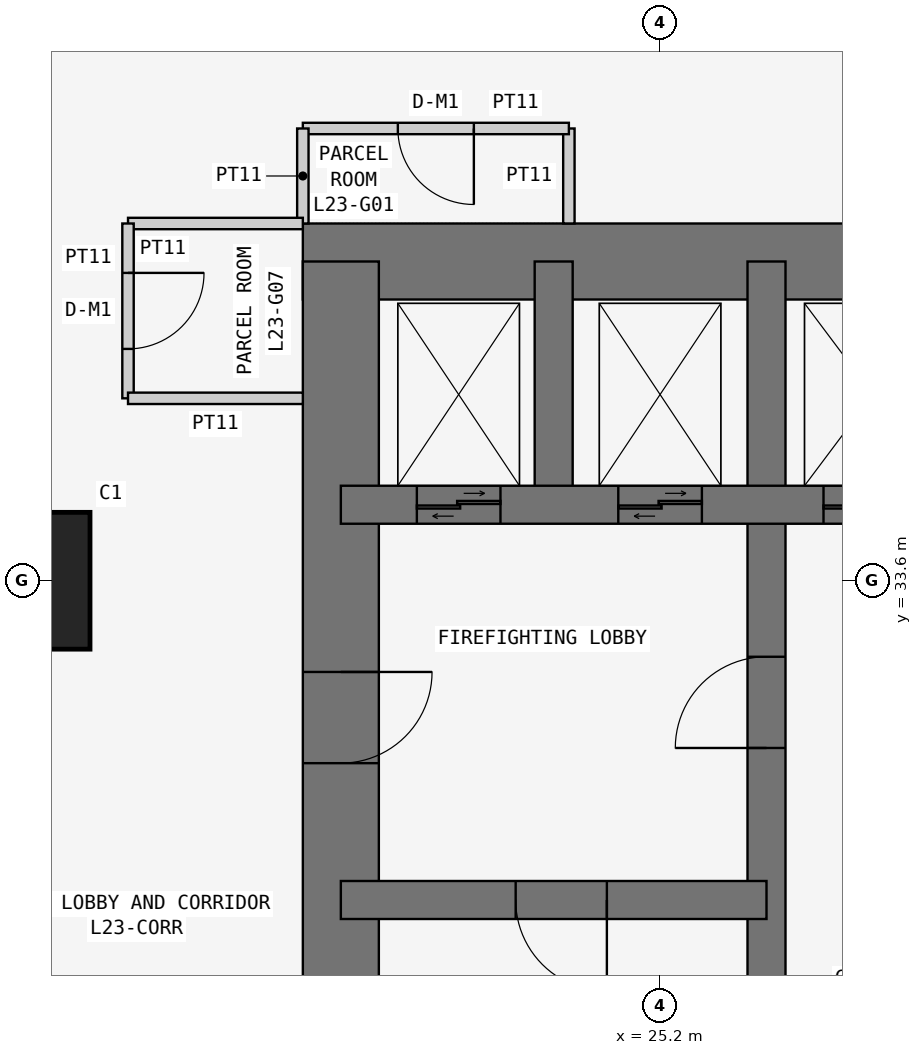
"""IFC4 building model, lengths in metres.
Left out: names, types, materials, properties, quantities, classifications, styles, units other than length and angle.
Written with IfcOpenShell. Run it as: python <this file> out.ifc"""

import sys

from ifc_helpers import new_model, si_unit, direction, frame, frame_2d, origin, origin_2d, place, context, subcontext, project, spatial, rectangle, extrude, element, fill, save


model = new_model("IFC4")
c1 = context("Model", 3, precision=1e-05, world=origin(), true_north=direction((0.0, 1.0)))
c2 = subcontext(c1, "Body", "Model", "MODEL_VIEW")
j1 = project(units=[si_unit("LENGTHUNIT", "METRE"), si_unit("PLANEANGLEUNIT", "RADIAN")], contexts=[c1])
p1 = place(None, origin())
s1 = spatial("IfcSite", under=j1, at=p1, CompositionType="ELEMENT")
p2 = place(p1, origin())
s2 = spatial("IfcBuilding", under=s1, at=p2, CompositionType="ELEMENT")
p3 = place(p2, frame((0.0, 0.0, 92.1)))
s3 = spatial("IfcBuildingStorey", under=s2, at=p3, CompositionType="ELEMENT", Elevation=92.1)
p4 = place(p3, frame((16.8, 33.6, 0.0), z_axis=(0.0, 0.0, 1.0), x_axis=(1.0, 0.0, 0.0)))
e1 = element("IfcColumn", 1, at=p4, inside=s3, PredefinedType="COLUMN", context=c2, shape_type="SweptSolid", body=[
    extrude(rectangle(XDim=1.8, YDim=1.8, at=origin_2d()), origin(), (0.0, 0.0, 1.0), 3.6),
])
p5 = place(p3, frame((37.8, 37.8, 0.0), z_axis=(0.0, 0.0, 1.0), x_axis=(-1.0, 0.0, 0.0)))
e2 = element("IfcWall", 2, at=p5, inside=s3, PredefinedType="SHEAR", context=c2, shape_type="SweptSolid", body=[
    extrude(rectangle(XDim=17.3, YDim=1.0, at=frame_2d((8.65, 0.0))), origin(), (0.0, 0.0, 1.0), 3.6),
])
p6 = place(p3, frame((21.0, 37.8, 0.0), z_axis=(0.0, 0.0, 1.0), x_axis=(0.0, -1.0, 0.0)))
e3 = element("IfcWall", 3, at=p6, inside=s3, PredefinedType="SHEAR", context=c2, shape_type="SweptSolid", body=[
    extrude(rectangle(XDim=17.3, YDim=1.0, at=frame_2d((8.65, 0.0))), origin(), (0.0, 0.0, 1.0), 3.6),
])
p7 = place(p6, frame((5.4, 0.0, 0.0)))
e4 = element("IfcOpeningElement", 4, at=p7, cuts=e3, PredefinedType="OPENING", context=c2, shape_type="SweptSolid", body=[
    extrude(rectangle(XDim=1.2, YDim=2.1, at=frame_2d((0.6, 1.05))), frame((0.0, 0.51, 0.0), z_axis=(0.0, -1.0, 0.0), x_axis=(1.0, 0.0, 0.0)), (0.0, 0.0, 1.0), 1.02),
])
p8 = place(p3, frame((26.6, 21.0, 0.0), z_axis=(0.0, 0.0, 1.0), x_axis=(0.0, 1.0, 0.0)))
e5 = element("IfcWall", 5, at=p8, inside=s3, PredefinedType="SHEAR", context=c2, shape_type="SweptSolid", body=[
    extrude(rectangle(XDim=16.8, YDim=0.5, at=frame_2d((8.4, 0.0))), origin(), (0.0, 0.0, 1.0), 3.6),
])
p9 = place(p8, frame((10.4, 0.0, 0.0)))
e6 = element("IfcOpeningElement", 6, at=p9, cuts=e5, PredefinedType="OPENING", context=c2, shape_type="SweptSolid", body=[
    extrude(rectangle(XDim=1.2, YDim=2.1, at=frame_2d((0.6, 1.05))), frame((0.0, 0.26, 0.0), z_axis=(0.0, -1.0, 0.0), x_axis=(1.0, 0.0, 0.0)), (0.0, 0.0, 1.0), 0.52),
])
p10 = place(p3, frame((21.0, 29.4, 0.0), z_axis=(0.0, 0.0, 1.0), x_axis=(1.0, 0.0, 0.0)))
e7 = element("IfcWall", 7, at=p10, inside=s3, PredefinedType="SHEAR", context=c2, shape_type="SweptSolid", body=[
    extrude(rectangle(XDim=5.6, YDim=0.5, at=frame_2d((2.8, 0.0))), origin(), (0.0, 0.0, 1.0), 3.6),
])
p11 = place(p10, frame((2.3, 0.0, 0.0)))
e8 = element("IfcOpeningElement", 8, at=p11, cuts=e7, PredefinedType="OPENING", context=c2, shape_type="SweptSolid", body=[
    extrude(rectangle(XDim=1.2, YDim=2.1, at=frame_2d((0.6, 1.05))), frame((0.0, 0.26, 0.0), z_axis=(0.0, -1.0, 0.0), x_axis=(1.0, 0.0, 0.0)), (0.0, 0.0, 1.0), 0.52),
])
p12 = place(p3, frame((21.0, 34.6, 0.0), z_axis=(0.0, 0.0, 1.0), x_axis=(1.0, 0.0, 0.0)))
e9 = element("IfcWall", 9, at=p12, inside=s3, PredefinedType="SHEAR", context=c2, shape_type="SweptSolid", body=[
    extrude(rectangle(XDim=11.2, YDim=0.5, at=frame_2d((5.6, 0.0))), origin(), (0.0, 0.0, 1.0), 3.6),
])
p13 = place(p12, frame((9.35, 0.0, 0.0)))
e10 = element("IfcOpeningElement", 10, at=p13, cuts=e9, PredefinedType="OPENING", context=c2, shape_type="SweptSolid", body=[
    extrude(rectangle(XDim=0.9, YDim=2.1, at=frame_2d((0.45, 1.05))), frame((0.0, 0.26, 0.0), z_axis=(0.0, -1.0, 0.0), x_axis=(1.0, 0.0, 0.0)), (0.0, 0.0, 1.0), 0.52),
])
p14 = place(p12, frame((1.0, 0.0, 0.0)))
e11 = element("IfcOpeningElement", 11, at=p14, cuts=e9, PredefinedType="OPENING", context=c2, shape_type="SweptSolid", body=[
    extrude(rectangle(XDim=1.1, YDim=2.1, at=frame_2d((0.55, 1.05))), frame((0.0, 0.26, 0.0), z_axis=(0.0, -1.0, 0.0), x_axis=(1.0, 0.0, 0.0)), (0.0, 0.0, 1.0), 0.52),
])
p15 = place(p12, frame((3.65, 0.0, 0.0)))
e12 = element("IfcOpeningElement", 12, at=p15, cuts=e9, PredefinedType="OPENING", context=c2, shape_type="SweptSolid", body=[
    extrude(rectangle(XDim=1.1, YDim=2.1, at=frame_2d((0.55, 1.05))), frame((0.0, 0.26, 0.0), z_axis=(0.0, -1.0, 0.0), x_axis=(1.0, 0.0, 0.0)), (0.0, 0.0, 1.0), 0.52),
])
p16 = place(p12, frame((6.35, 0.0, 0.0)))
e13 = element("IfcOpeningElement", 13, at=p16, cuts=e9, PredefinedType="OPENING", context=c2, shape_type="SweptSolid", body=[
    extrude(rectangle(XDim=1.3, YDim=2.1, at=frame_2d((0.65, 1.05))), frame((0.0, 0.26, 0.0), z_axis=(0.0, -1.0, 0.0), x_axis=(1.0, 0.0, 0.0)), (0.0, 0.0, 1.0), 0.52),
])
p17 = place(p3, frame((23.8, 34.6, 0.0), z_axis=(0.0, 0.0, 1.0), x_axis=(0.0, 1.0, 0.0)))
e14 = element("IfcWall", 14, at=p17, inside=s3, PredefinedType="SHEAR", context=c2, shape_type="SweptSolid", body=[
    extrude(rectangle(XDim=3.2, YDim=0.5, at=frame_2d((1.6, 0.0))), origin(), (0.0, 0.0, 1.0), 3.6),
])
p18 = place(p3, frame((24.0, 38.3, 0.0), z_axis=(0.0, 0.0, 1.0), x_axis=(0.0, 1.0, 0.0)))
e15 = element("IfcWall", 15, at=p18, inside=s3, PredefinedType="PARTITIONING", context=c2, shape_type="SweptSolid", body=[
    extrude(rectangle(XDim=1.25, YDim=0.15, at=frame_2d((0.625, 0.0))), origin(), (0.0, 0.0, 1.0), 3.45),
])
p19 = place(p3, frame((24.0, 39.55, 0.0), z_axis=(0.0, 0.0, 1.0), x_axis=(-1.0, 0.0, 0.0)))
e16 = element("IfcWall", 16, at=p19, inside=s3, PredefinedType="PARTITIONING", context=c2, shape_type="SweptSolid", body=[
    extrude(rectangle(XDim=3.5, YDim=0.15, at=frame_2d((1.75, 0.0))), origin(), (0.0, 0.0, 1.0), 3.45),
])
p20 = place(p19, frame((1.25, 0.0, 0.0)))
e17 = element("IfcOpeningElement", 17, at=p20, cuts=e16, PredefinedType="OPENING", context=c2, shape_type="SweptSolid", body=[
    extrude(rectangle(XDim=1.0, YDim=2.1, at=frame_2d((0.5, 1.05))), frame((0.0, 0.085, 0.0), z_axis=(0.0, -1.0, 0.0), x_axis=(1.0, 0.0, 0.0)), (0.0, 0.0, 1.0), 0.17),
])
p21 = place(p3, frame((20.5, 39.55, 0.0), z_axis=(0.0, 0.0, 1.0), x_axis=(0.0, -1.0, 0.0)))
e18 = element("IfcWall", 18, at=p21, inside=s3, PredefinedType="PARTITIONING", context=c2, shape_type="SweptSolid", body=[
    extrude(rectangle(XDim=1.25, YDim=0.15, at=frame_2d((0.625, 0.0))), origin(), (0.0, 0.0, 1.0), 3.45),
])
p22 = place(p3, frame((20.5, 38.3, 0.0), z_axis=(0.0, 0.0, 1.0), x_axis=(-1.0, 0.0, 0.0)))
e19 = element("IfcWall", 19, at=p22, inside=s3, PredefinedType="PARTITIONING", context=c2, shape_type="SweptSolid", body=[
    extrude(rectangle(XDim=2.3, YDim=0.15, at=frame_2d((1.15, 0.0))), origin(), (0.0, 0.0, 1.0), 3.45),
])
p23 = place(p3, frame((18.2, 38.3, 0.0), z_axis=(0.0, 0.0, 1.0), x_axis=(0.0, -1.0, 0.0)))
e20 = element("IfcWall", 20, at=p23, inside=s3, PredefinedType="PARTITIONING", context=c2, shape_type="SweptSolid", body=[
    extrude(rectangle(XDim=2.3, YDim=0.15, at=frame_2d((1.15, 0.0))), origin(), (0.0, 0.0, 1.0), 3.45),
])
p24 = place(p23, frame((0.65, 0.0, 0.0)))
e21 = element("IfcOpeningElement", 21, at=p24, cuts=e20, PredefinedType="OPENING", context=c2, shape_type="SweptSolid", body=[
    extrude(rectangle(XDim=1.0, YDim=2.1, at=frame_2d((0.5, 1.05))), frame((0.0, 0.085, 0.0), z_axis=(0.0, -1.0, 0.0), x_axis=(1.0, 0.0, 0.0)), (0.0, 0.0, 1.0), 0.17),
])
p25 = place(p3, frame((18.2, 36.0, 0.0), z_axis=(0.0, 0.0, 1.0), x_axis=(1.0, 0.0, 0.0)))
e22 = element("IfcWall", 22, at=p25, inside=s3, PredefinedType="PARTITIONING", context=c2, shape_type="SweptSolid", body=[
    extrude(rectangle(XDim=2.3, YDim=0.15, at=frame_2d((1.15, 0.0))), origin(), (0.0, 0.0, 1.0), 3.45),
])
p26 = place(p20, origin())
e23 = element("IfcDoor", 23, at=p26, inside=s3, OperationType="SINGLE_SWING_LEFT", PredefinedType="DOOR", context=c2, shape_type="SweptSolid", body=[
    extrude(rectangle(XDim=1.0, YDim=2.1, at=frame_2d((0.5, 1.05))), frame((0.0, 0.025, 0.0), z_axis=(0.0, -1.0, 0.0), x_axis=(1.0, 0.0, 0.0)), (0.0, 0.0, 1.0), 0.05),
])
fill(e17, e23)
p27 = place(p24, origin())
e24 = element("IfcDoor", 24, at=p27, inside=s3, OperationType="SINGLE_SWING_LEFT", PredefinedType="DOOR", context=c2, shape_type="SweptSolid", body=[
    extrude(rectangle(XDim=1.0, YDim=2.1, at=frame_2d((0.5, 1.05))), frame((0.0, 0.025, 0.0), z_axis=(0.0, -1.0, 0.0), x_axis=(1.0, 0.0, 0.0)), (0.0, 0.0, 1.0), 0.05),
])
fill(e21, e24)
p28 = place(p7, origin())
e25 = element("IfcDoor", 25, at=p28, inside=s3, OperationType="SINGLE_SWING_LEFT", PredefinedType="DOOR", context=c2, shape_type="SweptSolid", body=[
    extrude(rectangle(XDim=1.2, YDim=2.1, at=frame_2d((0.6, 1.05))), frame((0.0, 0.025, 0.0), z_axis=(0.0, -1.0, 0.0), x_axis=(1.0, 0.0, 0.0)), (0.0, 0.0, 1.0), 0.05),
])
fill(e4, e25)
p29 = place(p11, frame((1.2, 0.0, 0.0), z_axis=(0.0, 0.0, 1.0), x_axis=(-1.0, 0.0, 0.0)))
e26 = element("IfcDoor", 26, at=p29, inside=s3, OperationType="SINGLE_SWING_LEFT", PredefinedType="DOOR", context=c2, shape_type="SweptSolid", body=[
    extrude(rectangle(XDim=1.2, YDim=2.1, at=frame_2d((0.6, 1.05))), frame((0.0, 0.025, 0.0), z_axis=(0.0, -1.0, 0.0), x_axis=(1.0, 0.0, 0.0)), (0.0, 0.0, 1.0), 0.05),
])
fill(e8, e26)
p30 = place(p9, origin())
e27 = element("IfcDoor", 27, at=p30, inside=s3, OperationType="SINGLE_SWING_LEFT", PredefinedType="DOOR", context=c2, shape_type="SweptSolid", body=[
    extrude(rectangle(XDim=1.2, YDim=2.1, at=frame_2d((0.6, 1.05))), frame((0.0, 0.025, 0.0), z_axis=(0.0, -1.0, 0.0), x_axis=(1.0, 0.0, 0.0)), (0.0, 0.0, 1.0), 0.05),
])
fill(e6, e27)
p31 = place(p14, origin())
e28 = element("IfcDoor", 28, at=p31, inside=s3, OperationType="DOUBLE_DOOR_SLIDING", PredefinedType="DOOR", context=c2, shape_type="SweptSolid", body=[
    extrude(rectangle(XDim=1.1, YDim=2.1, at=frame_2d((0.55, 1.05))), frame((0.0, 0.025, 0.0), z_axis=(0.0, -1.0, 0.0), x_axis=(1.0, 0.0, 0.0)), (0.0, 0.0, 1.0), 0.05),
])
fill(e11, e28)
p32 = place(p15, origin())
e29 = element("IfcDoor", 29, at=p32, inside=s3, OperationType="DOUBLE_DOOR_SLIDING", PredefinedType="DOOR", context=c2, shape_type="SweptSolid", body=[
    extrude(rectangle(XDim=1.1, YDim=2.1, at=frame_2d((0.55, 1.05))), frame((0.0, 0.025, 0.0), z_axis=(0.0, -1.0, 0.0), x_axis=(1.0, 0.0, 0.0)), (0.0, 0.0, 1.0), 0.05),
])
fill(e12, e29)
p33 = place(p16, origin())
e30 = element("IfcDoor", 30, at=p33, inside=s3, OperationType="DOUBLE_DOOR_SLIDING", PredefinedType="DOOR", context=c2, shape_type="SweptSolid", body=[
    extrude(rectangle(XDim=1.3, YDim=2.1, at=frame_2d((0.65, 1.05))), frame((0.0, 0.025, 0.0), z_axis=(0.0, -1.0, 0.0), x_axis=(1.0, 0.0, 0.0)), (0.0, 0.0, 1.0), 0.05),
])
fill(e13, e30)
save(model, sys.argv[1])
